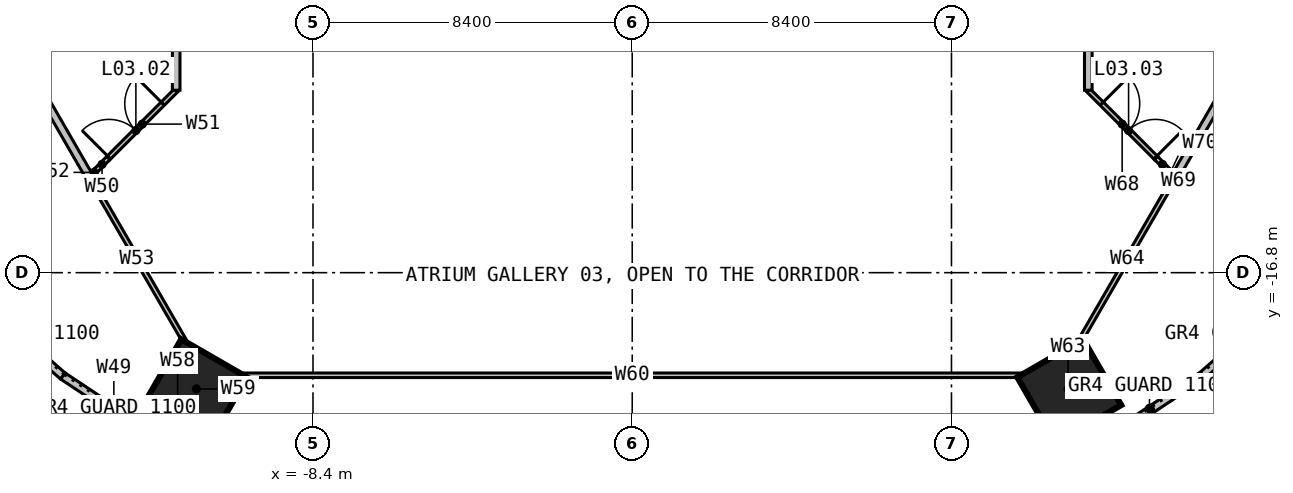
"""IFC4 building model, lengths in metres.
Left out: names, types, materials, properties, quantities, classifications, styles, units other than length and angle.
Written with IfcOpenShell. Run it as: python <this file> out.ifc"""

import sys

from ifc_helpers import new_model, si_unit, direction, frame, frame_2d, origin, origin_2d, place, context, subcontext, project, spatial, rectangle, hollow_rectangle, extrude, element, fill, save


model = new_model("IFC4")
c1 = context("Model", 3, precision=1e-05, world=origin(), true_north=direction((0.0, 1.0)))
c2 = subcontext(c1, "Body", "Model", "MODEL_VIEW")
j1 = project(units=[si_unit("LENGTHUNIT", "METRE"), si_unit("PLANEANGLEUNIT", "RADIAN")], contexts=[c1])
p1 = place(None, origin())
s1 = spatial("IfcSite", under=j1, at=p1, CompositionType="ELEMENT")
p2 = place(p1, origin())
s2 = spatial("IfcBuilding", under=s1, at=p2, CompositionType="ELEMENT")
p3 = place(p2, frame((0.0, 0.0, 16.0)))
s3 = spatial("IfcBuildingStorey", under=s2, at=p3, CompositionType="ELEMENT", Elevation=16.0)
for number, where, z_axis, x_axis in (
    (1, (-11.5, -19.919, 0.0), (0.0, 0.0, 1.0), (-0.5, -0.866, 0.0)),
    (2, (11.5, -19.919, 0.0), (0.0, 0.0, 1.0), (0.5, -0.866, 0.0)),
):
    element("IfcColumn", number, at=place(p3, frame(where, z_axis=z_axis, x_axis=x_axis)), inside=s3, PredefinedType="COLUMN", context=c2, shape_type="SweptSolid", body=[
        extrude(hollow_rectangle(XDim=2.0, YDim=2.0, WallThickness=0.24, at=origin_2d()), origin(), (0.0, 0.0, 1.0), 4.29),
    ])
p4 = place(p3, frame((-22.0, -0.901, 0.0), z_axis=(0.0, 0.0, 1.0), x_axis=(0.499789042554, -0.866147165869, 0.0)))
e3 = element("IfcWall", 3, at=p4, inside=s3, PredefinedType="PARTITIONING", context=c2, shape_type="SweptSolid", body=[
    extrude(rectangle(XDim=15.447, YDim=0.2, at=frame_2d((7.723, 0.0))), origin(), (0.0, 0.0, 1.0), 1.89),
])
for number, where, z_axis, x_axis in (
    (4, (-17.4, -17.4, 0.0), (0.0, 0.0, 1.0), (0.752, -0.659, 0.0)),
    (5, (-14.98, -19.52, 0.0), (0.0, 0.0, 1.0), (0.833, -0.553, 0.0)),
):
    element("IfcWall", number, at=place(p3, frame(where, z_axis=z_axis, x_axis=x_axis)), inside=s3, PredefinedType="PARTITIONING", context=c2, shape_type="SweptSolid", body=[
        extrude(rectangle(XDim=3.217, YDim=0.2, at=frame_2d((1.609, 0.0))), origin(), (0.0, 0.0, 1.0), 4.7),
    ])
p5 = place(p3, frame((-14.12, -14.12, 0.0), z_axis=(0.0, 0.0, 1.0), x_axis=(0.707106781187, 0.707106781187, 0.0)))
e6 = element("IfcWall", 6, at=p5, inside=s3, PredefinedType="PARTITIONING", context=c2, shape_type="SweptSolid", body=[
    extrude(rectangle(XDim=0.479, YDim=0.12, at=frame_2d((0.24, 0.0))), origin(), (0.0, 0.0, 1.0), 4.7),
])
p6 = place(p3, frame((-13.781, -13.781, 0.0), z_axis=(0.0, 0.0, 1.0), x_axis=(0.707106781187, 0.707106781187, 0.0)))
e7 = element("IfcWall", 7, at=p6, inside=s3, PredefinedType="PARTITIONING", context=c2, shape_type="SweptSolid", body=[
    extrude(rectangle(XDim=2.519, YDim=0.12, at=frame_2d((1.26, 0.0))), origin(), (0.0, 0.0, 1.0), 3.79),
])
p7 = place(p6, frame((0.02, 0.0, 0.0)))
e8 = element("IfcOpeningElement", 8, at=p7, cuts=e7, PredefinedType="OPENING", context=c2, shape_type="SweptSolid", body=[
    extrude(rectangle(XDim=2.0, YDim=2.4, at=frame_2d((1.0, 1.2))), frame((0.0, 0.07, 0.0), z_axis=(0.0, -1.0, 0.0), x_axis=(1.0, 0.0, 0.0)), (0.0, 0.0, 1.0), 0.14),
])
p8 = place(p3, frame((-14.201, -14.201, 0.0), z_axis=(0.0, 0.0, 1.0), x_axis=(0.707106781187, 0.707106781187, 0.0)))
e9 = element("IfcWall", 9, at=p8, inside=s3, PredefinedType="PARTITIONING", context=c2, shape_type="SweptSolid", body=[
    extrude(rectangle(XDim=0.114, YDim=0.12, at=frame_2d((0.057, 0.0))), origin(), (0.0, 0.0, 1.0), 1.89),
])
p9 = place(p3, frame((-14.28, -14.28, 0.0), z_axis=(0.0, 0.0, 1.0), x_axis=(0.500785735381, -0.865571283742, 0.0)))
e10 = element("IfcWall", 10, at=p9, inside=s3, PredefinedType="PARTITIONING", context=c2, shape_type="SweptSolid", body=[
    extrude(rectangle(XDim=4.994, YDim=0.12, at=frame_2d((2.497, 0.0))), origin(), (0.0, 0.0, 1.0), 1.89),
])
p10 = place(p3, frame((-12.3, -21.3, 0.0), z_axis=(0.0, 0.0, 1.0), x_axis=(0.500367750624, 0.865812978729, 0.0)))
e11 = element("IfcWall", 11, at=p10, inside=s3, PredefinedType="PARTITIONING", context=c2, shape_type="SweptSolid", body=[
    extrude(rectangle(XDim=1.354, YDim=0.2, at=frame_2d((0.677, 0.0))), origin(), (0.0, 0.0, 1.0), 4.7),
])
p11 = place(p3, frame((-11.62, -20.123, 0.0), z_axis=(0.0, 0.0, 1.0), x_axis=(0.500418219013, 0.865783810244, 0.0)))
e12 = element("IfcWall", 12, at=p11, inside=s3, PredefinedType="PARTITIONING", context=c2, shape_type="SweptSolid", body=[
    extrude(rectangle(XDim=0.607, YDim=0.2, at=frame_2d((0.304, 0.0))), origin(), (0.0, 0.0, 1.0), 1.89),
])
p12 = place(p3, frame((-10.225, -19.5, 0.0), z_axis=(0.0, 0.0, 1.0), x_axis=(1.0, 0.0, 0.0)))
e13 = element("IfcWall", 13, at=p12, inside=s3, PredefinedType="PARTITIONING", context=c2, shape_type="SweptSolid", body=[
    extrude(rectangle(XDim=20.45, YDim=0.12, at=frame_2d((10.225, 0.0))), origin(), (0.0, 0.0, 1.0), 1.89),
])
p13 = place(p3, frame((11.623, -20.128, 0.0), z_axis=(0.0, 0.0, 1.0), x_axis=(0.500367750624, -0.865812978729, 0.0)))
e14 = element("IfcWall", 14, at=p13, inside=s3, PredefinedType="PARTITIONING", context=c2, shape_type="SweptSolid", body=[
    extrude(rectangle(XDim=1.354, YDim=0.2, at=frame_2d((0.677, 0.0))), origin(), (0.0, 0.0, 1.0), 4.7),
])
p14 = place(p3, frame((11.316, -19.597, 0.0), z_axis=(0.0, 0.0, 1.0), x_axis=(0.500418219013, -0.865783810244, 0.0)))
e15 = element("IfcWall", 15, at=p14, inside=s3, PredefinedType="PARTITIONING", context=c2, shape_type="SweptSolid", body=[
    extrude(rectangle(XDim=0.607, YDim=0.2, at=frame_2d((0.304, 0.0))), origin(), (0.0, 0.0, 1.0), 1.89),
])
p15 = place(p3, frame((11.779, -18.603, 0.0), z_axis=(0.0, 0.0, 1.0), x_axis=(0.500785735381, 0.865571283742, 0.0)))
e16 = element("IfcWall", 16, at=p15, inside=s3, PredefinedType="PARTITIONING", context=c2, shape_type="SweptSolid", body=[
    extrude(rectangle(XDim=4.994, YDim=0.12, at=frame_2d((2.497, 0.0))), origin(), (0.0, 0.0, 1.0), 1.89),
])
p16 = place(p3, frame((12.0, -12.0, 0.0), z_axis=(0.0, 0.0, 1.0), x_axis=(0.707106781187, -0.707106781187, 0.0)))
e17 = element("IfcWall", 17, at=p16, inside=s3, PredefinedType="PARTITIONING", context=c2, shape_type="SweptSolid", body=[
    extrude(rectangle(XDim=2.519, YDim=0.12, at=frame_2d((1.26, 0.0))), origin(), (0.0, 0.0, 1.0), 3.79),
])
p17 = place(p16, frame((0.499, 0.0, 0.0)))
e18 = element("IfcOpeningElement", 18, at=p17, cuts=e17, PredefinedType="OPENING", context=c2, shape_type="SweptSolid", body=[
    extrude(rectangle(XDim=2.0, YDim=2.4, at=frame_2d((1.0, 1.2))), frame((0.0, 0.07, 0.0), z_axis=(0.0, -1.0, 0.0), x_axis=(1.0, 0.0, 0.0)), (0.0, 0.0, 1.0), 0.14),
])
p18 = place(p3, frame((13.781, -13.781, 0.0), z_axis=(0.0, 0.0, 1.0), x_axis=(0.707106781187, -0.707106781187, 0.0)))
e19 = element("IfcWall", 19, at=p18, inside=s3, PredefinedType="PARTITIONING", context=c2, shape_type="SweptSolid", body=[
    extrude(rectangle(XDim=0.479, YDim=0.12, at=frame_2d((0.24, 0.0))), origin(), (0.0, 0.0, 1.0), 4.7),
])
p19 = place(p3, frame((14.12, -14.12, 0.0), z_axis=(0.0, 0.0, 1.0), x_axis=(0.707106781187, -0.707106781187, 0.0)))
e20 = element("IfcWall", 20, at=p19, inside=s3, PredefinedType="PARTITIONING", context=c2, shape_type="SweptSolid", body=[
    extrude(rectangle(XDim=0.114, YDim=0.12, at=frame_2d((0.057, 0.0))), origin(), (0.0, 0.0, 1.0), 1.89),
])
p20 = place(p3, frame((12.3, -21.3, 0.0), z_axis=(0.0, 0.0, 1.0), x_axis=(0.832994734858, 0.553280915719, 0.0)))
e21 = element("IfcWall", 21, at=p20, inside=s3, PredefinedType="PARTITIONING", context=c2, shape_type="SweptSolid", body=[
    extrude(rectangle(XDim=3.217, YDim=0.2, at=frame_2d((1.609, 0.0))), origin(), (0.0, 0.0, 1.0), 4.7),
])
p21 = place(p3, frame((14.28, -14.28, 0.0), z_axis=(0.0, 0.0, 1.0), x_axis=(0.499789042554, 0.866147165869, 0.0)))
e22 = element("IfcWall", 22, at=p21, inside=s3, PredefinedType="PARTITIONING", context=c2, shape_type="SweptSolid", body=[
    extrude(rectangle(XDim=15.447, YDim=0.2, at=frame_2d((7.723, 0.0))), origin(), (0.0, 0.0, 1.0), 1.89),
])
p22 = place(p3, frame((14.98, -19.52, 0.0), z_axis=(0.0, 0.0, 1.0), x_axis=(0.752162877314, 0.658977242392, 0.0)))
e23 = element("IfcWall", 23, at=p22, inside=s3, PredefinedType="PARTITIONING", context=c2, shape_type="SweptSolid", body=[
    extrude(rectangle(XDim=3.217, YDim=0.2, at=frame_2d((1.609, 0.0))), origin(), (0.0, 0.0, 1.0), 4.7),
])
for number, where, z_axis, x_axis in (
    (24, (12.0, -12.0, 0.0), (0.0, 0.0, 1.0), (0.0, 1.0, 0.0)),
    (25, (-12.0, 12.0, 0.0), (0.0, 0.0, 1.0), (0.0, -1.0, 0.0)),
):
    element("IfcWall", number, at=place(p3, frame(where, z_axis=z_axis, x_axis=x_axis)), inside=s3, PredefinedType="PARTITIONING", context=c2, shape_type="SweptSolid", body=[
        extrude(rectangle(XDim=24.0, YDim=0.2, at=frame_2d((12.0, 0.0))), origin(), (0.0, 0.0, 1.0), 4.7),
    ])
p23 = place(p7, origin())
e26 = element("IfcDoor", 26, at=p23, inside=s3, OperationType="DOUBLE_DOOR_SINGLE_SWING", PredefinedType="DOOR", context=c2, shape_type="SweptSolid", body=[
    extrude(rectangle(XDim=2.0, YDim=2.4, at=frame_2d((1.0, 1.2))), frame((0.0, 0.025, 0.0), z_axis=(0.0, -1.0, 0.0), x_axis=(1.0, 0.0, 0.0)), (0.0, 0.0, 1.0), 0.05),
])
fill(e8, e26)
p24 = place(p17, origin())
e27 = element("IfcDoor", 27, at=p24, inside=s3, OperationType="DOUBLE_DOOR_SINGLE_SWING", PredefinedType="DOOR", context=c2, shape_type="SweptSolid", body=[
    extrude(rectangle(XDim=2.0, YDim=2.4, at=frame_2d((1.0, 1.2))), frame((0.0, 0.025, 0.0), z_axis=(0.0, -1.0, 0.0), x_axis=(1.0, 0.0, 0.0)), (0.0, 0.0, 1.0), 0.05),
])
fill(e18, e27)
save(model, sys.argv[1])
